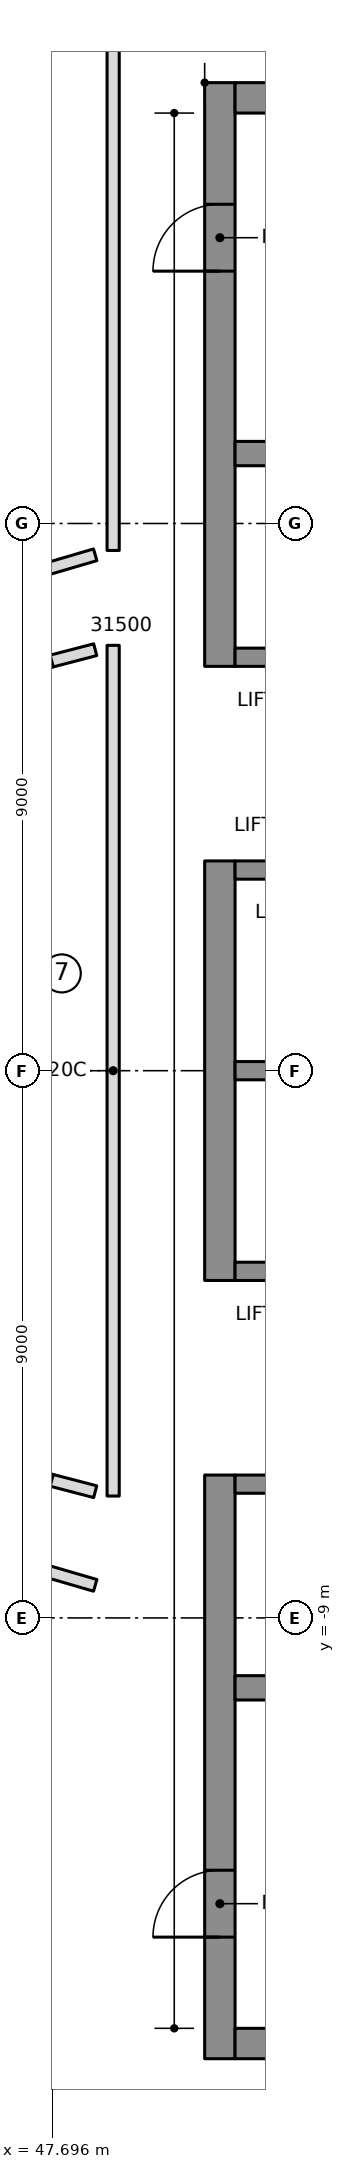
"""IFC4 building model, lengths in metres.
Left out: names, types, materials, properties, quantities, classifications, styles, units other than length and angle.
Written with IfcOpenShell. Run it as: python <this file> out.ifc"""

import sys

from ifc_helpers import new_model, si_unit, direction, frame, frame_2d, origin, place, context, subcontext, project, spatial, rectangle, extrude, element, fill, save


model = new_model("IFC4")
c1 = context("Model", 3, precision=1e-05, world=origin(), true_north=direction((0.0, 1.0)))
c2 = subcontext(c1, "Body", "Model", "MODEL_VIEW")
j1 = project(units=[si_unit("LENGTHUNIT", "METRE"), si_unit("PLANEANGLEUNIT", "RADIAN")], contexts=[c1])
p1 = place(None, origin())
s1 = spatial("IfcSite", under=j1, at=p1, CompositionType="ELEMENT")
p2 = place(p1, origin())
s2 = spatial("IfcBuilding", under=s1, at=p2, CompositionType="ELEMENT")
p3 = place(p2, frame((0.0, 0.0, 278.55)))
s3 = spatial("IfcBuildingStorey", under=s2, at=p3, CompositionType="ELEMENT", Elevation=278.55)
p4 = place(p3, frame((50.45, 6.65, 0.0), z_axis=(0.0, 0.0, 1.0), x_axis=(0.0, 1.0, 0.0)))
e1 = element("IfcWall", 1, at=p4, inside=s3, PredefinedType="SHEAR", context=c2, shape_type="SweptSolid", body=[
    extrude(rectangle(XDim=9.6, YDim=0.5, at=frame_2d((4.8, 0.0))), origin(), (0.0, 0.0, 1.0), 3.55),
])
p5 = place(p4, frame((6.5, 0.0, 0.0)))
e2 = element("IfcOpeningElement", 2, at=p5, cuts=e1, PredefinedType="OPENING", context=c2, shape_type="SweptSolid", body=[
    extrude(rectangle(XDim=1.1, YDim=2.1, at=frame_2d((0.55, 1.05))), frame((0.0, 0.26, 0.0), z_axis=(0.0, -1.0, 0.0), x_axis=(1.0, 0.0, 0.0)), (0.0, 0.0, 1.0), 0.52),
])
p6 = place(p3, frame((50.45, -3.45, 0.0), z_axis=(0.0, 0.0, 1.0), x_axis=(0.0, 1.0, 0.0)))
e3 = element("IfcWall", 3, at=p6, inside=s3, PredefinedType="SHEAR", context=c2, shape_type="SweptSolid", body=[
    extrude(rectangle(XDim=6.9, YDim=0.5, at=frame_2d((3.45, 0.0))), origin(), (0.0, 0.0, 1.0), 3.55),
])
p7 = place(p3, frame((50.45, -16.25, 0.0), z_axis=(0.0, 0.0, 1.0), x_axis=(0.0, 1.0, 0.0)))
e4 = element("IfcWall", 4, at=p7, inside=s3, PredefinedType="SHEAR", context=c2, shape_type="SweptSolid", body=[
    extrude(rectangle(XDim=9.6, YDim=0.5, at=frame_2d((4.8, 0.0))), origin(), (0.0, 0.0, 1.0), 3.55),
])
p8 = place(p7, frame((2.0, 0.0, 0.0)))
e5 = element("IfcOpeningElement", 5, at=p8, cuts=e4, PredefinedType="OPENING", context=c2, shape_type="SweptSolid", body=[
    extrude(rectangle(XDim=1.1, YDim=2.1, at=frame_2d((0.55, 1.05))), frame((0.0, 0.26, 0.0), z_axis=(0.0, -1.0, 0.0), x_axis=(1.0, 0.0, 0.0)), (0.0, 0.0, 1.0), 0.52),
])
for number, where, z_axis, x_axis in (
    (6, (50.7, 16.0, 0.0), (0.0, 0.0, 1.0), (1.0, 0.0, 0.0)),
    (7, (50.7, -16.0, 0.0), (0.0, 0.0, 1.0), (1.0, 0.0, 0.0)),
):
    element("IfcWall", number, at=place(p3, frame(where, z_axis=z_axis, x_axis=x_axis)), inside=s3, PredefinedType="SHEAR", context=c2, shape_type="SweptSolid", body=[
        extrude(rectangle(XDim=13.52, YDim=0.5, at=frame_2d((6.76, 0.0))), origin(), (0.0, 0.0, 1.0), 3.55),
    ])
p9 = place(p3, frame((50.7, 10.15, 0.0), z_axis=(0.0, 0.0, 1.0), x_axis=(1.0, 0.0, 0.0)))
e8 = element("IfcWall", 8, at=p9, inside=s3, PredefinedType="SHEAR", context=c2, shape_type="SweptSolid", body=[
    extrude(rectangle(XDim=13.02, YDim=0.4, at=frame_2d((6.51, 0.0))), origin(), (0.0, 0.0, 1.0), 3.55),
])
p10 = place(p9, frame((0.7, 0.0, 0.0)))
e9 = element("IfcOpeningElement", 9, at=p10, cuts=e8, PredefinedType="OPENING", context=c2, shape_type="SweptSolid", body=[
    extrude(rectangle(XDim=1.1, YDim=2.1, at=frame_2d((0.55, 1.05))), frame((0.0, 0.21, 0.0), z_axis=(0.0, -1.0, 0.0), x_axis=(1.0, 0.0, 0.0)), (0.0, 0.0, 1.0), 0.42),
])
p11 = place(p9, frame((3.5, 0.0, 0.0)))
e10 = element("IfcOpeningElement", 10, at=p11, cuts=e8, PredefinedType="OPENING", context=c2, shape_type="SweptSolid", body=[
    extrude(rectangle(XDim=1.1, YDim=2.1, at=frame_2d((0.55, 1.05))), frame((0.0, 0.21, 0.0), z_axis=(0.0, -1.0, 0.0), x_axis=(1.0, 0.0, 0.0)), (0.0, 0.0, 1.0), 0.42),
])
p12 = place(p3, frame((50.7, -10.15, 0.0), z_axis=(0.0, 0.0, 1.0), x_axis=(1.0, 0.0, 0.0)))
e11 = element("IfcWall", 11, at=p12, inside=s3, PredefinedType="SHEAR", context=c2, shape_type="SweptSolid", body=[
    extrude(rectangle(XDim=13.02, YDim=0.4, at=frame_2d((6.51, 0.0))), origin(), (0.0, 0.0, 1.0), 3.55),
])
p13 = place(p3, frame((50.7, 0.0, 0.0), z_axis=(0.0, 0.0, 1.0), x_axis=(1.0, 0.0, 0.0)))
e12 = element("IfcWall", 12, at=p13, inside=s3, PredefinedType="SHEAR", context=c2, shape_type="SweptSolid", body=[
    extrude(rectangle(XDim=10.9, YDim=0.3, at=frame_2d((5.45, 0.0))), origin(), (0.0, 0.0, 1.0), 3.55),
])
p14 = place(p3, frame((50.7, 3.3, 0.0), z_axis=(0.0, 0.0, 1.0), x_axis=(1.0, 0.0, 0.0)))
e13 = element("IfcWall", 13, at=p14, inside=s3, PredefinedType="SHEAR", context=c2, shape_type="SweptSolid", body=[
    extrude(rectangle(XDim=10.9, YDim=0.3, at=frame_2d((5.45, 0.0))), origin(), (0.0, 0.0, 1.0), 3.55),
])
p15 = place(p14, frame((0.7, 0.0, 0.0)))
e14 = element("IfcOpeningElement", 14, at=p15, cuts=e13, PredefinedType="OPENING", context=c2, shape_type="SweptSolid", body=[
    extrude(rectangle(XDim=1.1, YDim=2.1, at=frame_2d((0.55, 1.05))), frame((0.0, 0.16, 0.0), z_axis=(0.0, -1.0, 0.0), x_axis=(1.0, 0.0, 0.0)), (0.0, 0.0, 1.0), 0.32),
])
p16 = place(p14, frame((3.5, 0.0, 0.0)))
e15 = element("IfcOpeningElement", 15, at=p16, cuts=e13, PredefinedType="OPENING", context=c2, shape_type="SweptSolid", body=[
    extrude(rectangle(XDim=1.1, YDim=2.1, at=frame_2d((0.55, 1.05))), frame((0.0, 0.16, 0.0), z_axis=(0.0, -1.0, 0.0), x_axis=(1.0, 0.0, 0.0)), (0.0, 0.0, 1.0), 0.32),
])
p17 = place(p14, frame((6.4, 0.0, 0.0)))
e16 = element("IfcOpeningElement", 16, at=p17, cuts=e13, PredefinedType="OPENING", context=c2, shape_type="SweptSolid", body=[
    extrude(rectangle(XDim=0.9, YDim=2.1, at=frame_2d((0.45, 1.05))), frame((0.0, 0.16, 0.0), z_axis=(0.0, -1.0, 0.0), x_axis=(1.0, 0.0, 0.0)), (0.0, 0.0, 1.0), 0.32),
])
p18 = place(p14, frame((9.2, 0.0, 0.0)))
e17 = element("IfcOpeningElement", 17, at=p18, cuts=e13, PredefinedType="OPENING", context=c2, shape_type="SweptSolid", body=[
    extrude(rectangle(XDim=0.9, YDim=2.1, at=frame_2d((0.45, 1.05))), frame((0.0, 0.16, 0.0), z_axis=(0.0, -1.0, 0.0), x_axis=(1.0, 0.0, 0.0)), (0.0, 0.0, 1.0), 0.32),
])
p19 = place(p3, frame((50.7, 6.8, 0.0), z_axis=(0.0, 0.0, 1.0), x_axis=(1.0, 0.0, 0.0)))
e18 = element("IfcWall", 18, at=p19, inside=s3, PredefinedType="SHEAR", context=c2, shape_type="SweptSolid", body=[
    extrude(rectangle(XDim=10.9, YDim=0.3, at=frame_2d((5.45, 0.0))), origin(), (0.0, 0.0, 1.0), 3.55),
])
p20 = place(p19, frame((6.4, 0.0, 0.0)))
e19 = element("IfcOpeningElement", 19, at=p20, cuts=e18, PredefinedType="OPENING", context=c2, shape_type="SweptSolid", body=[
    extrude(rectangle(XDim=0.9, YDim=2.1, at=frame_2d((0.45, 1.05))), frame((0.0, 0.16, 0.0), z_axis=(0.0, -1.0, 0.0), x_axis=(1.0, 0.0, 0.0)), (0.0, 0.0, 1.0), 0.32),
])
p21 = place(p19, frame((9.2, 0.0, 0.0)))
e20 = element("IfcOpeningElement", 20, at=p21, cuts=e18, PredefinedType="OPENING", context=c2, shape_type="SweptSolid", body=[
    extrude(rectangle(XDim=0.9, YDim=2.1, at=frame_2d((0.45, 1.05))), frame((0.0, 0.16, 0.0), z_axis=(0.0, -1.0, 0.0), x_axis=(1.0, 0.0, 0.0)), (0.0, 0.0, 1.0), 0.32),
])
p22 = place(p3, frame((50.7, -3.3, 0.0), z_axis=(0.0, 0.0, 1.0), x_axis=(1.0, 0.0, 0.0)))
e21 = element("IfcWall", 21, at=p22, inside=s3, PredefinedType="SHEAR", context=c2, shape_type="SweptSolid", body=[
    extrude(rectangle(XDim=10.9, YDim=0.3, at=frame_2d((5.45, 0.0))), origin(), (0.0, 0.0, 1.0), 3.55),
])
p23 = place(p22, frame((9.1, 0.0, 0.0)))
e22 = element("IfcOpeningElement", 22, at=p23, cuts=e21, PredefinedType="OPENING", context=c2, shape_type="SweptSolid", body=[
    extrude(rectangle(XDim=1.1, YDim=2.1, at=frame_2d((0.55, 1.05))), frame((0.0, 0.16, 0.0), z_axis=(0.0, -1.0, 0.0), x_axis=(1.0, 0.0, 0.0)), (0.0, 0.0, 1.0), 0.32),
])
p24 = place(p3, frame((50.7, -6.8, 0.0), z_axis=(0.0, 0.0, 1.0), x_axis=(1.0, 0.0, 0.0)))
e23 = element("IfcWall", 23, at=p24, inside=s3, PredefinedType="SHEAR", context=c2, shape_type="SweptSolid", body=[
    extrude(rectangle(XDim=10.9, YDim=0.3, at=frame_2d((5.45, 0.0))), origin(), (0.0, 0.0, 1.0), 3.55),
])
p25 = place(p24, frame((6.3, 0.0, 0.0)))
e24 = element("IfcOpeningElement", 24, at=p25, cuts=e23, PredefinedType="OPENING", context=c2, shape_type="SweptSolid", body=[
    extrude(rectangle(XDim=1.1, YDim=2.1, at=frame_2d((0.55, 1.05))), frame((0.0, 0.16, 0.0), z_axis=(0.0, -1.0, 0.0), x_axis=(1.0, 0.0, 0.0)), (0.0, 0.0, 1.0), 0.32),
])
p26 = place(p24, frame((9.1, 0.0, 0.0)))
e25 = element("IfcOpeningElement", 25, at=p26, cuts=e23, PredefinedType="OPENING", context=c2, shape_type="SweptSolid", body=[
    extrude(rectangle(XDim=1.1, YDim=2.1, at=frame_2d((0.55, 1.05))), frame((0.0, 0.16, 0.0), z_axis=(0.0, -1.0, 0.0), x_axis=(1.0, 0.0, 0.0)), (0.0, 0.0, 1.0), 0.32),
])
p27 = place(p24, frame((0.8, 0.0, 0.0)))
e26 = element("IfcOpeningElement", 26, at=p27, cuts=e23, PredefinedType="OPENING", context=c2, shape_type="SweptSolid", body=[
    extrude(rectangle(XDim=0.9, YDim=2.1, at=frame_2d((0.45, 1.05))), frame((0.0, 0.16, 0.0), z_axis=(0.0, -1.0, 0.0), x_axis=(1.0, 0.0, 0.0)), (0.0, 0.0, 1.0), 0.32),
])
p28 = place(p24, frame((3.6, 0.0, 0.0)))
e27 = element("IfcOpeningElement", 27, at=p28, cuts=e23, PredefinedType="OPENING", context=c2, shape_type="SweptSolid", body=[
    extrude(rectangle(XDim=0.9, YDim=2.1, at=frame_2d((0.45, 1.05))), frame((0.0, 0.16, 0.0), z_axis=(0.0, -1.0, 0.0), x_axis=(1.0, 0.0, 0.0)), (0.0, 0.0, 1.0), 0.32),
])
p29 = place(p3, frame((43.918, 5.675, 0.0), z_axis=(0.0, 0.0, 1.0), x_axis=(0.962411212211, 0.271596499628, 0.0)))
e28 = element("IfcWall", 28, at=p29, inside=s3, PredefinedType="PARTITIONING", context=c2, shape_type="SweptSolid", body=[
    extrude(rectangle(XDim=3.913, YDim=0.2, at=frame_2d((1.957, 0.0))), origin(), (0.0, 0.0, 1.0), 3.25),
])
p30 = place(p29, frame((1.457, 0.0, 0.0)))
e29 = element("IfcOpeningElement", 29, at=p30, cuts=e28, PredefinedType="OPENING", context=c2, shape_type="SweptSolid", body=[
    extrude(rectangle(XDim=1.0, YDim=2.1, at=frame_2d((0.5, 1.05))), frame((0.0, 0.11, 0.0), z_axis=(0.0, -1.0, 0.0), x_axis=(1.0, 0.0, 0.0)), (0.0, 0.0, 1.0), 0.22),
])
p31 = place(p3, frame((47.684, -6.738, 0.0), z_axis=(0.0, 0.0, 1.0), x_axis=(-0.962411212211, 0.271596499628, 0.0)))
e30 = element("IfcWall", 30, at=p31, inside=s3, PredefinedType="PARTITIONING", context=c2, shape_type="SweptSolid", body=[
    extrude(rectangle(XDim=3.913, YDim=0.2, at=frame_2d((1.957, 0.0))), origin(), (0.0, 0.0, 1.0), 3.25),
])
p32 = place(p3, frame((48.4, 8.485, 0.0), z_axis=(0.0, 0.0, 1.0), x_axis=(-0.959461783262, -0.281838759682, 0.0)))
e31 = element("IfcWall", 31, at=p32, inside=s3, PredefinedType="PARTITIONING", context=c2, shape_type="SweptSolid", body=[
    extrude(rectangle(XDim=10.694, YDim=0.2, at=frame_2d((5.347, 0.0))), origin(), (0.0, 0.0, 1.0), 3.25),
])
p33 = place(p32, frame((4.847, 0.0, 0.0)))
e32 = element("IfcOpeningElement", 32, at=p33, cuts=e31, PredefinedType="OPENING", context=c2, shape_type="SweptSolid", body=[
    extrude(rectangle(XDim=1.0, YDim=2.1, at=frame_2d((0.5, 1.05))), frame((0.0, 0.11, 0.0), z_axis=(0.0, -1.0, 0.0), x_axis=(1.0, 0.0, 0.0)), (0.0, 0.0, 1.0), 0.22),
])
p34 = place(p3, frame((38.14, -5.471, 0.0), z_axis=(0.0, 0.0, 1.0), x_axis=(0.95996673497, -0.280114026339, 0.0)))
e33 = element("IfcWall", 33, at=p34, inside=s3, PredefinedType="PARTITIONING", context=c2, shape_type="SweptSolid", body=[
    extrude(rectangle(XDim=10.688, YDim=0.2, at=frame_2d((5.344, 0.0))), origin(), (0.0, 0.0, 1.0), 3.25),
])
p35 = place(p34, frame((3.7, 0.0, 0.0)))
e34 = element("IfcOpeningElement", 34, at=p35, cuts=e33, PredefinedType="OPENING", context=c2, shape_type="SweptSolid", body=[
    extrude(rectangle(XDim=1.0, YDim=2.1, at=frame_2d((0.5, 1.05))), frame((0.0, 0.11, 0.0), z_axis=(0.0, -1.0, 0.0), x_axis=(1.0, 0.0, 0.0)), (0.0, 0.0, 1.0), 0.22),
])
for number, where, z_axis, x_axis in (
    (35, (47.684, 6.738, 0.0), (0.0, 0.0, 1.0), (0.968, 0.253, 0.0)),
    (36, (48.4, -6.924, 0.0), (0.0, 0.0, 1.0), (-0.968, 0.253, 0.0)),
):
    element("IfcWall", number, at=place(p3, frame(where, z_axis=z_axis, x_axis=x_axis)), inside=s3, PredefinedType="PARTITIONING", context=c2, shape_type="SweptSolid", body=[
        extrude(rectangle(XDim=0.74, YDim=0.2, at=frame_2d((0.37, 0.0))), origin(), (0.0, 0.0, 1.0), 3.25),
    ])
p36 = place(p3, frame((48.695, 6.996, 0.0), z_axis=(0.0, 0.0, 1.0), x_axis=(0.0, -1.0, 0.0)))
e37 = element("IfcWall", 37, at=p36, inside=s3, PredefinedType="PARTITIONING", context=c2, shape_type="SweptSolid", body=[
    extrude(rectangle(XDim=13.992, YDim=0.2, at=frame_2d((6.996, 0.0))), origin(), (0.0, 0.0, 1.0), 3.25),
])
p37 = place(p3, frame((48.695, 18.553, 0.0), z_axis=(0.0, 0.0, 1.0), x_axis=(0.0, -1.0, 0.0)))
e38 = element("IfcWall", 38, at=p37, inside=s3, PredefinedType="PARTITIONING", context=c2, shape_type="SweptSolid", body=[
    extrude(rectangle(XDim=9.997, YDim=0.2, at=frame_2d((4.998, 0.0))), origin(), (0.0, 0.0, 1.0), 3.25),
])
p38 = place(p5, origin())
e39 = element("IfcDoor", 39, at=p38, inside=s3, OperationType="SINGLE_SWING_RIGHT", PredefinedType="DOOR", context=c2, shape_type="SweptSolid", body=[
    extrude(rectangle(XDim=1.1, YDim=2.1, at=frame_2d((0.55, 1.05))), frame((0.0, 0.025, 0.0), z_axis=(0.0, -1.0, 0.0), x_axis=(1.0, 0.0, 0.0)), (0.0, 0.0, 1.0), 0.05),
])
fill(e2, e39)
p39 = place(p8, origin())
e40 = element("IfcDoor", 40, at=p39, inside=s3, OperationType="SINGLE_SWING_RIGHT", PredefinedType="DOOR", context=c2, shape_type="SweptSolid", body=[
    extrude(rectangle(XDim=1.1, YDim=2.1, at=frame_2d((0.55, 1.05))), frame((0.0, 0.025, 0.0), z_axis=(0.0, -1.0, 0.0), x_axis=(1.0, 0.0, 0.0)), (0.0, 0.0, 1.0), 0.05),
])
fill(e5, e40)
save(model, sys.argv[1])
